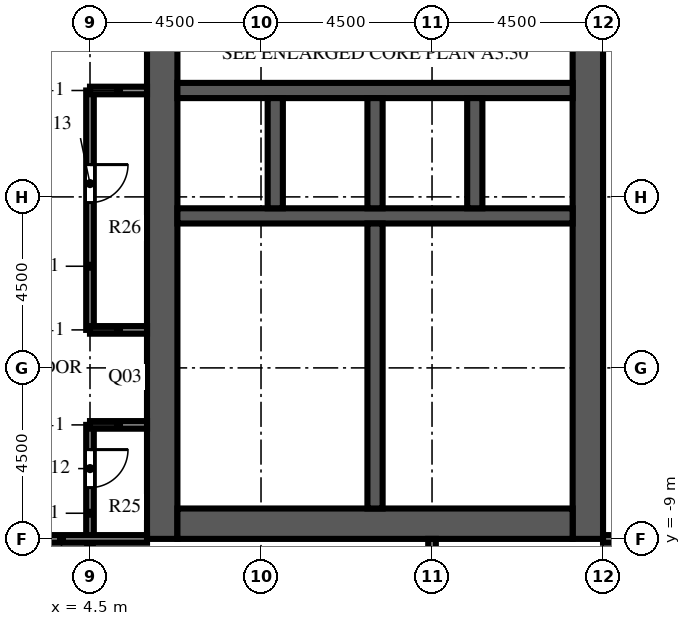
"""IFC4 building model, lengths in metres.
Left out: names, types, materials, properties, quantities, classifications, styles, units other than length and angle.
Written with IfcOpenShell. Run it as: python <this file> out.ifc"""

import sys

from ifc_helpers import new_model, si_unit, direction, frame, frame_2d, origin, place, context, subcontext, project, spatial, rectangle, extrude, element, fill, save


model = new_model("IFC4")
c1 = context("Model", 3, precision=1e-05, world=origin(), true_north=direction((0.0, 1.0)))
c2 = subcontext(c1, "Body", "Model", "MODEL_VIEW")
j1 = project(units=[si_unit("LENGTHUNIT", "METRE"), si_unit("PLANEANGLEUNIT", "RADIAN")], contexts=[c1])
p1 = place(None, origin())
s1 = spatial("IfcSite", under=j1, at=p1, CompositionType="ELEMENT")
p2 = place(p1, origin())
s2 = spatial("IfcBuilding", under=s1, at=p2, CompositionType="ELEMENT")
p3 = place(p2, frame((0.0, 0.0, 199.7)))
s3 = spatial("IfcBuildingStorey", under=s2, at=p3, CompositionType="ELEMENT", Elevation=199.7)
p4 = place(p3, frame((6.4, -9.0, 0.0), z_axis=(0.0, 0.0, 1.0), x_axis=(0.0, 1.0, 0.0)))
e1 = element("IfcWall", 1, at=p4, inside=s3, PredefinedType="SHEAR", context=c2, shape_type="SweptSolid", body=[
    extrude(rectangle(XDim=27.5, YDim=0.8, at=frame_2d((13.75, 0.0))), origin(), (0.0, 0.0, 1.0), 4.1),
])
p5 = place(p4, frame((12.55, 0.0, 0.0)))
e2 = element("IfcOpeningElement", 2, at=p5, cuts=e1, PredefinedType="OPENING", context=c2, shape_type="SweptSolid", body=[
    extrude(rectangle(XDim=2.4, YDim=2.4, at=frame_2d((1.2, 1.2))), frame((0.0, 0.41, 0.0), z_axis=(0.0, -1.0, 0.0), x_axis=(1.0, 0.0, 0.0)), (0.0, 0.0, 1.0), 0.82),
])
p6 = place(p4, frame((3.95, 0.0, 0.0)))
e3 = element("IfcOpeningElement", 3, at=p6, cuts=e1, PredefinedType="OPENING", context=c2, shape_type="SweptSolid", body=[
    extrude(rectangle(XDim=1.2, YDim=2.1, at=frame_2d((0.6, 1.05))), frame((0.0, 0.41, 0.0), z_axis=(0.0, -1.0, 0.0), x_axis=(1.0, 0.0, 0.0)), (0.0, 0.0, 1.0), 0.82),
])
p7 = place(p4, frame((19.45, 0.0, 0.0)))
e4 = element("IfcOpeningElement", 4, at=p7, cuts=e1, PredefinedType="OPENING", context=c2, shape_type="SweptSolid", body=[
    extrude(rectangle(XDim=1.0, YDim=2.1, at=frame_2d((0.5, 1.05))), frame((0.0, 0.41, 0.0), z_axis=(0.0, -1.0, 0.0), x_axis=(1.0, 0.0, 0.0)), (0.0, 0.0, 1.0), 0.82),
])
p8 = place(p4, frame((21.137, 0.0, 0.0)))
e5 = element("IfcOpeningElement", 5, at=p8, cuts=e1, PredefinedType="OPENING", context=c2, shape_type="SweptSolid", body=[
    extrude(rectangle(XDim=1.0, YDim=2.1, at=frame_2d((0.5, 1.05))), frame((0.0, 0.41, 0.0), z_axis=(0.0, -1.0, 0.0), x_axis=(1.0, 0.0, 0.0)), (0.0, 0.0, 1.0), 0.82),
])
p9 = place(p4, frame((23.2, 0.0, 0.0)))
e6 = element("IfcOpeningElement", 6, at=p9, cuts=e1, PredefinedType="OPENING", context=c2, shape_type="SweptSolid", body=[
    extrude(rectangle(XDim=1.0, YDim=2.1, at=frame_2d((0.5, 1.05))), frame((0.0, 0.41, 0.0), z_axis=(0.0, -1.0, 0.0), x_axis=(1.0, 0.0, 0.0)), (0.0, 0.0, 1.0), 0.82),
])
p10 = place(p4, frame((25.262, 0.0, 0.0)))
e7 = element("IfcOpeningElement", 7, at=p10, cuts=e1, PredefinedType="OPENING", context=c2, shape_type="SweptSolid", body=[
    extrude(rectangle(XDim=1.0, YDim=2.1, at=frame_2d((0.5, 1.05))), frame((0.0, 0.41, 0.0), z_axis=(0.0, -1.0, 0.0), x_axis=(1.0, 0.0, 0.0)), (0.0, 0.0, 1.0), 0.82),
])
p11 = place(p3, frame((17.6, -9.0, 0.0), z_axis=(0.0, 0.0, 1.0), x_axis=(0.0, 1.0, 0.0)))
e8 = element("IfcWall", 8, at=p11, inside=s3, PredefinedType="SHEAR", context=c2, shape_type="SweptSolid", body=[
    extrude(rectangle(XDim=27.5, YDim=0.8, at=frame_2d((13.75, 0.0))), origin(), (0.0, 0.0, 1.0), 4.1),
])
p12 = place(p11, frame((12.55, 0.0, 0.0)))
e9 = element("IfcOpeningElement", 9, at=p12, cuts=e8, PredefinedType="OPENING", context=c2, shape_type="SweptSolid", body=[
    extrude(rectangle(XDim=2.4, YDim=2.4, at=frame_2d((1.2, 1.2))), frame((0.0, 0.41, 0.0), z_axis=(0.0, -1.0, 0.0), x_axis=(1.0, 0.0, 0.0)), (0.0, 0.0, 1.0), 0.82),
])
p13 = place(p11, frame((6.825, 0.0, 0.0)))
e10 = element("IfcOpeningElement", 10, at=p13, cuts=e8, PredefinedType="OPENING", context=c2, shape_type="SweptSolid", body=[
    extrude(rectangle(XDim=1.2, YDim=2.1, at=frame_2d((0.6, 1.05))), frame((0.0, 0.41, 0.0), z_axis=(0.0, -1.0, 0.0), x_axis=(1.0, 0.0, 0.0)), (0.0, 0.0, 1.0), 0.82),
])
p14 = place(p11, frame((19.475, 0.0, 0.0)))
e11 = element("IfcOpeningElement", 11, at=p14, cuts=e8, PredefinedType="OPENING", context=c2, shape_type="SweptSolid", body=[
    extrude(rectangle(XDim=1.2, YDim=2.1, at=frame_2d((0.6, 1.05))), frame((0.0, 0.41, 0.0), z_axis=(0.0, -1.0, 0.0), x_axis=(1.0, 0.0, 0.0)), (0.0, 0.0, 1.0), 0.82),
])
p15 = place(p3, frame((6.8, -8.6, 0.0), z_axis=(0.0, 0.0, 1.0), x_axis=(1.0, 0.0, 0.0)))
e12 = element("IfcWall", 12, at=p15, inside=s3, PredefinedType="SHEAR", context=c2, shape_type="SweptSolid", body=[
    extrude(rectangle(XDim=10.4, YDim=0.8, at=frame_2d((5.2, 0.0))), origin(), (0.0, 0.0, 1.0), 4.1),
])
p16 = place(p3, frame((6.8, -0.5, 0.0), z_axis=(0.0, 0.0, 1.0), x_axis=(1.0, 0.0, 0.0)))
e13 = element("IfcWall", 13, at=p16, inside=s3, PredefinedType="SHEAR", context=c2, shape_type="SweptSolid", body=[
    extrude(rectangle(XDim=10.4, YDim=0.4, at=frame_2d((5.2, 0.0))), origin(), (0.0, 0.0, 1.0), 4.1),
])
p17 = place(p3, frame((6.8, 2.8, 0.0), z_axis=(0.0, 0.0, 1.0), x_axis=(1.0, 0.0, 0.0)))
e14 = element("IfcWall", 14, at=p17, inside=s3, PredefinedType="SHEAR", context=c2, shape_type="SweptSolid", body=[
    extrude(rectangle(XDim=10.4, YDim=0.4, at=frame_2d((5.2, 0.0))), origin(), (0.0, 0.0, 1.0), 4.1),
])
p18 = place(p17, frame((0.738, 0.0, 0.0)))
e15 = element("IfcOpeningElement", 15, at=p18, cuts=e14, PredefinedType="OPENING", context=c2, shape_type="SweptSolid", body=[
    extrude(rectangle(XDim=1.1, YDim=2.1, at=frame_2d((0.55, 1.05))), frame((0.0, 0.21, 0.0), z_axis=(0.0, -1.0, 0.0), x_axis=(1.0, 0.0, 0.0)), (0.0, 0.0, 1.0), 0.42),
])
p19 = place(p17, frame((3.337, 0.0, 0.0)))
e16 = element("IfcOpeningElement", 16, at=p19, cuts=e14, PredefinedType="OPENING", context=c2, shape_type="SweptSolid", body=[
    extrude(rectangle(XDim=1.1, YDim=2.1, at=frame_2d((0.55, 1.05))), frame((0.0, 0.21, 0.0), z_axis=(0.0, -1.0, 0.0), x_axis=(1.0, 0.0, 0.0)), (0.0, 0.0, 1.0), 0.42),
])
p20 = place(p17, frame((6.012, 0.0, 0.0)))
e17 = element("IfcOpeningElement", 17, at=p20, cuts=e14, PredefinedType="OPENING", context=c2, shape_type="SweptSolid", body=[
    extrude(rectangle(XDim=1.0, YDim=2.1, at=frame_2d((0.5, 1.05))), frame((0.0, 0.21, 0.0), z_axis=(0.0, -1.0, 0.0), x_axis=(1.0, 0.0, 0.0)), (0.0, 0.0, 1.0), 0.42),
])
p21 = place(p17, frame((8.613, 0.0, 0.0)))
e18 = element("IfcOpeningElement", 18, at=p21, cuts=e14, PredefinedType="OPENING", context=c2, shape_type="SweptSolid", body=[
    extrude(rectangle(XDim=1.0, YDim=2.1, at=frame_2d((0.5, 1.05))), frame((0.0, 0.21, 0.0), z_axis=(0.0, -1.0, 0.0), x_axis=(1.0, 0.0, 0.0)), (0.0, 0.0, 1.0), 0.42),
])
for number, where, z_axis, x_axis in (
    (19, (9.375, -0.3, 0.0), (0.0, 0.0, 1.0), (0.0, 1.0, 0.0)),
    (20, (12.0, -0.3, 0.0), (0.0, 0.0, 1.0), (0.0, 1.0, 0.0)),
    (21, (14.625, -0.3, 0.0), (0.0, 0.0, 1.0), (0.0, 1.0, 0.0)),
):
    element("IfcWall", number, at=place(p3, frame(where, z_axis=z_axis, x_axis=x_axis)), inside=s3, PredefinedType="SHEAR", context=c2, shape_type="SweptSolid", body=[
        extrude(rectangle(XDim=2.9, YDim=0.4, at=frame_2d((1.45, 0.0))), origin(), (0.0, 0.0, 1.0), 4.1),
    ])
p22 = place(p3, frame((12.0, -8.2, 0.0), z_axis=(0.0, 0.0, 1.0), x_axis=(0.0, 1.0, 0.0)))
e22 = element("IfcWall", 22, at=p22, inside=s3, PredefinedType="SHEAR", context=c2, shape_type="SweptSolid", body=[
    extrude(rectangle(XDim=7.5, YDim=0.4, at=frame_2d((3.75, 0.0))), origin(), (0.0, 0.0, 1.0), 4.1),
])
p23 = place(p3, frame((6.8, -5.95, 0.0), z_axis=(0.0, 0.0, 1.0), x_axis=(1.0, 0.0, 0.0)))
e23 = element("IfcWall", 23, at=p23, inside=s3, PredefinedType="PARTITIONING", context=c2, shape_type="SweptSolid", body=[
    extrude(rectangle(XDim=1.6, YDim=0.1, at=frame_2d((0.8, 0.0))), origin(), (0.0, 0.0, 1.0), 3.65),
])
p24 = place(p23, frame((0.3, 0.0, 0.0)))
e24 = element("IfcOpeningElement", 24, at=p24, cuts=e23, PredefinedType="OPENING", context=c2, shape_type="SweptSolid", body=[
    extrude(rectangle(XDim=1.0, YDim=2.1, at=frame_2d((0.5, 1.05))), frame((0.0, 0.06, 0.0), z_axis=(0.0, -1.0, 0.0), x_axis=(1.0, 0.0, 0.0)), (0.0, 0.0, 1.0), 0.12),
])
p25 = place(p3, frame((6.8, -2.95, 0.0), z_axis=(0.0, 0.0, 1.0), x_axis=(1.0, 0.0, 0.0)))
e25 = element("IfcWall", 25, at=p25, inside=s3, PredefinedType="PARTITIONING", context=c2, shape_type="SweptSolid", body=[
    extrude(rectangle(XDim=1.6, YDim=0.1, at=frame_2d((0.8, 0.0))), origin(), (0.0, 0.0, 1.0), 3.65),
])
p26 = place(p25, frame((0.3, 0.0, 0.0)))
e26 = element("IfcOpeningElement", 26, at=p26, cuts=e25, PredefinedType="OPENING", context=c2, shape_type="SweptSolid", body=[
    extrude(rectangle(XDim=1.0, YDim=2.1, at=frame_2d((0.5, 1.05))), frame((0.0, 0.06, 0.0), z_axis=(0.0, -1.0, 0.0), x_axis=(1.0, 0.0, 0.0)), (0.0, 0.0, 1.0), 0.12),
])
p27 = place(p3, frame((8.4, -5.95, 0.0), z_axis=(0.0, 0.0, 1.0), x_axis=(0.0, 1.0, 0.0)))
e27 = element("IfcWall", 27, at=p27, inside=s3, PredefinedType="PARTITIONING", context=c2, shape_type="SweptSolid", body=[
    extrude(rectangle(XDim=3.0, YDim=0.1, at=frame_2d((1.5, 0.0))), origin(), (0.0, 0.0, 1.0), 3.65),
])
p28 = place(p27, frame((1.0, 0.0, 0.0)))
e28 = element("IfcOpeningElement", 28, at=p28, cuts=e27, PredefinedType="OPENING", context=c2, shape_type="SweptSolid", body=[
    extrude(rectangle(XDim=1.0, YDim=2.1, at=frame_2d((0.5, 1.05))), frame((0.0, 0.06, 0.0), z_axis=(0.0, -1.0, 0.0), x_axis=(1.0, 0.0, 0.0)), (0.0, 0.0, 1.0), 0.12),
])
for number, where, z_axis, x_axis in (
    (29, (8.4, -5.95, 0.0), (0.0, 0.0, 1.0), (1.0, 0.0, 0.0)),
    (30, (8.4, -2.95, 0.0), (0.0, 0.0, 1.0), (1.0, 0.0, 0.0)),
):
    element("IfcWall", number, at=place(p3, frame(where, z_axis=z_axis, x_axis=x_axis)), inside=s3, PredefinedType="PARTITIONING", context=c2, shape_type="SweptSolid", body=[
        extrude(rectangle(XDim=3.4, YDim=0.1, at=frame_2d((1.7, 0.0))), origin(), (0.0, 0.0, 1.0), 3.65),
    ])
p29 = place(p3, frame((4.5, -9.0, 0.0), z_axis=(0.0, 0.0, 1.0), x_axis=(0.0, -1.0, 0.0)))
e31 = element("IfcWall", 31, at=p29, inside=s3, PredefinedType="PARTITIONING", context=c2, shape_type="SweptSolid", body=[
    extrude(rectangle(XDim=17.5, YDim=0.15, at=frame_2d((8.75, 0.0))), origin(), (0.0, 0.0, 1.0), 3.65),
])
p30 = place(p29, frame((3.4, 0.0, 0.0)))
e32 = element("IfcOpeningElement", 32, at=p30, cuts=e31, PredefinedType="OPENING", context=c2, shape_type="SweptSolid", body=[
    extrude(rectangle(XDim=1.0, YDim=2.1, at=frame_2d((0.5, 1.05))), frame((0.0, 0.085, 0.0), z_axis=(0.0, -1.0, 0.0), x_axis=(1.0, 0.0, 0.0)), (0.0, 0.0, 1.0), 0.17),
])
p31 = place(p3, frame((4.5, -6.0, 0.0), z_axis=(0.0, 0.0, 1.0), x_axis=(0.0, -1.0, 0.0)))
e33 = element("IfcWall", 33, at=p31, inside=s3, PredefinedType="PARTITIONING", context=c2, shape_type="SweptSolid", body=[
    extrude(rectangle(XDim=3.0, YDim=0.2, at=frame_2d((1.5, 0.0))), origin(), (0.0, 0.0, 1.0), 3.65),
])
p32 = place(p31, frame((0.65, 0.0, 0.0)))
e34 = element("IfcOpeningElement", 34, at=p32, cuts=e33, PredefinedType="OPENING", context=c2, shape_type="SweptSolid", body=[
    extrude(rectangle(XDim=1.0, YDim=2.1, at=frame_2d((0.5, 1.05))), frame((0.0, 0.11, 0.0), z_axis=(0.0, -1.0, 0.0), x_axis=(1.0, 0.0, 0.0)), (0.0, 0.0, 1.0), 0.22),
])
p33 = place(p3, frame((4.5, 2.8, 0.0), z_axis=(0.0, 0.0, 1.0), x_axis=(0.0, -1.0, 0.0)))
e35 = element("IfcWall", 35, at=p33, inside=s3, PredefinedType="PARTITIONING", context=c2, shape_type="SweptSolid", body=[
    extrude(rectangle(XDim=6.3, YDim=0.2, at=frame_2d((3.15, 0.0))), origin(), (0.0, 0.0, 1.0), 3.65),
])
p34 = place(p33, frame((1.95, 0.0, 0.0)))
e36 = element("IfcOpeningElement", 36, at=p34, cuts=e35, PredefinedType="OPENING", context=c2, shape_type="SweptSolid", body=[
    extrude(rectangle(XDim=1.0, YDim=2.1, at=frame_2d((0.5, 1.05))), frame((0.0, 0.11, 0.0), z_axis=(0.0, -1.0, 0.0), x_axis=(1.0, 0.0, 0.0)), (0.0, 0.0, 1.0), 0.22),
])
p35 = place(p3, frame((13.5, -26.5, 0.0), z_axis=(0.0, 0.0, 1.0), x_axis=(0.0, 1.0, 0.0)))
e37 = element("IfcWall", 37, at=p35, inside=s3, PredefinedType="PARTITIONING", context=c2, shape_type="SweptSolid", body=[
    extrude(rectangle(XDim=17.5, YDim=0.2, at=frame_2d((8.75, 0.0))), origin(), (0.0, 0.0, 1.0), 3.65),
])
p36 = place(p3, frame((1.5, -9.0, 0.0), z_axis=(0.0, 0.0, 1.0), x_axis=(1.0, 0.0, 0.0)))
e38 = element("IfcWall", 38, at=p36, inside=s3, PredefinedType="PARTITIONING", context=c2, shape_type="SweptSolid", body=[
    extrude(rectangle(XDim=4.5, YDim=0.2, at=frame_2d((2.25, 0.0))), origin(), (0.0, 0.0, 1.0), 3.65),
])
p37 = place(p3, frame((21.0, -9.0, 0.0), z_axis=(0.0, 0.0, 1.0), x_axis=(-1.0, 0.0, 0.0)))
e39 = element("IfcWall", 39, at=p37, inside=s3, PredefinedType="PARTITIONING", context=c2, shape_type="SweptSolid", body=[
    extrude(rectangle(XDim=3.0, YDim=0.2, at=frame_2d((1.5, 0.0))), origin(), (0.0, 0.0, 1.0), 3.65),
])
p38 = place(p37, frame((0.9, 0.0, 0.0)))
e40 = element("IfcOpeningElement", 40, at=p38, cuts=e39, PredefinedType="OPENING", context=c2, shape_type="SweptSolid", body=[
    extrude(rectangle(XDim=1.0, YDim=2.1, at=frame_2d((0.5, 1.05))), frame((0.0, 0.11, 0.0), z_axis=(0.0, -1.0, 0.0), x_axis=(1.0, 0.0, 0.0)), (0.0, 0.0, 1.0), 0.22),
])
for number, where, z_axis, x_axis in (
    (41, (4.5, -6.0, 0.0), (0.0, 0.0, 1.0), (1.0, 0.0, 0.0)),
    (42, (4.5, -3.5, 0.0), (0.0, 0.0, 1.0), (1.0, 0.0, 0.0)),
    (43, (4.5, 2.8, 0.0), (0.0, 0.0, 1.0), (1.0, 0.0, 0.0)),
):
    element("IfcWall", number, at=place(p3, frame(where, z_axis=z_axis, x_axis=x_axis)), inside=s3, PredefinedType="PARTITIONING", context=c2, shape_type="SweptSolid", body=[
        extrude(rectangle(XDim=1.5, YDim=0.2, at=frame_2d((0.75, 0.0))), origin(), (0.0, 0.0, 1.0), 3.65),
    ])
p39 = place(p18, origin())
e44 = element("IfcDoor", 44, at=p39, inside=s3, OperationType="DOUBLE_DOOR_SLIDING", PredefinedType="DOOR", context=c2, shape_type="SweptSolid", body=[
    extrude(rectangle(XDim=1.1, YDim=2.1, at=frame_2d((0.55, 1.05))), frame((0.0, 0.025, 0.0), z_axis=(0.0, -1.0, 0.0), x_axis=(1.0, 0.0, 0.0)), (0.0, 0.0, 1.0), 0.05),
])
fill(e15, e44)
p40 = place(p19, origin())
e45 = element("IfcDoor", 45, at=p40, inside=s3, OperationType="DOUBLE_DOOR_SLIDING", PredefinedType="DOOR", context=c2, shape_type="SweptSolid", body=[
    extrude(rectangle(XDim=1.1, YDim=2.1, at=frame_2d((0.55, 1.05))), frame((0.0, 0.025, 0.0), z_axis=(0.0, -1.0, 0.0), x_axis=(1.0, 0.0, 0.0)), (0.0, 0.0, 1.0), 0.05),
])
fill(e16, e45)
p41 = place(p5, origin())
e46 = element("IfcDoor", 46, at=p41, inside=s3, OperationType="DOUBLE_DOOR_DOUBLE_SWING", PredefinedType="DOOR", context=c2, shape_type="SweptSolid", body=[
    extrude(rectangle(XDim=2.4, YDim=2.4, at=frame_2d((1.2, 1.2))), frame((0.0, 0.025, 0.0), z_axis=(0.0, -1.0, 0.0), x_axis=(1.0, 0.0, 0.0)), (0.0, 0.0, 1.0), 0.05),
])
fill(e2, e46)
p42 = place(p12, origin())
e47 = element("IfcDoor", 47, at=p42, inside=s3, OperationType="DOUBLE_DOOR_DOUBLE_SWING", PredefinedType="DOOR", context=c2, shape_type="SweptSolid", body=[
    extrude(rectangle(XDim=2.4, YDim=2.4, at=frame_2d((1.2, 1.2))), frame((0.0, 0.025, 0.0), z_axis=(0.0, -1.0, 0.0), x_axis=(1.0, 0.0, 0.0)), (0.0, 0.0, 1.0), 0.05),
])
fill(e9, e47)
p43 = place(p13, frame((1.2, 0.0, 0.0), z_axis=(0.0, 0.0, 1.0), x_axis=(-1.0, 0.0, 0.0)))
e48 = element("IfcDoor", 48, at=p43, inside=s3, OperationType="SINGLE_SWING_LEFT", PredefinedType="DOOR", context=c2, shape_type="SweptSolid", body=[
    extrude(rectangle(XDim=1.2, YDim=2.1, at=frame_2d((0.6, 1.05))), frame((0.0, 0.025, 0.0), z_axis=(0.0, -1.0, 0.0), x_axis=(1.0, 0.0, 0.0)), (0.0, 0.0, 1.0), 0.05),
])
fill(e10, e48)
p44 = place(p20, origin())
e49 = element("IfcDoor", 49, at=p44, inside=s3, OperationType="SINGLE_SWING_LEFT", PredefinedType="DOOR", context=c2, shape_type="SweptSolid", body=[
    extrude(rectangle(XDim=1.0, YDim=2.1, at=frame_2d((0.5, 1.05))), frame((0.0, 0.025, 0.0), z_axis=(0.0, -1.0, 0.0), x_axis=(1.0, 0.0, 0.0)), (0.0, 0.0, 1.0), 0.05),
])
fill(e17, e49)
p45 = place(p21, origin())
e50 = element("IfcDoor", 50, at=p45, inside=s3, OperationType="SINGLE_SWING_RIGHT", PredefinedType="DOOR", context=c2, shape_type="SweptSolid", body=[
    extrude(rectangle(XDim=1.0, YDim=2.1, at=frame_2d((0.5, 1.05))), frame((0.0, 0.025, 0.0), z_axis=(0.0, -1.0, 0.0), x_axis=(1.0, 0.0, 0.0)), (0.0, 0.0, 1.0), 0.05),
])
fill(e18, e50)
p46 = place(p6, origin())
e51 = element("IfcDoor", 51, at=p46, inside=s3, OperationType="SINGLE_SWING_RIGHT", PredefinedType="DOOR", context=c2, shape_type="SweptSolid", body=[
    extrude(rectangle(XDim=1.2, YDim=2.1, at=frame_2d((0.6, 1.05))), frame((0.0, -0.325, 0.0), z_axis=(0.0, -1.0, 0.0), x_axis=(1.0, 0.0, 0.0)), (0.0, 0.0, 1.0), 0.05),
])
fill(e3, e51)
p47 = place(p24, origin())
e52 = element("IfcDoor", 52, at=p47, inside=s3, OperationType="SINGLE_SWING_LEFT", PredefinedType="DOOR", context=c2, shape_type="SweptSolid", body=[
    extrude(rectangle(XDim=1.0, YDim=2.1, at=frame_2d((0.5, 1.05))), frame((0.0, 0.025, 0.0), z_axis=(0.0, -1.0, 0.0), x_axis=(1.0, 0.0, 0.0)), (0.0, 0.0, 1.0), 0.05),
])
fill(e24, e52)
p48 = place(p26, origin())
e53 = element("IfcDoor", 53, at=p48, inside=s3, OperationType="SINGLE_SWING_RIGHT", PredefinedType="DOOR", context=c2, shape_type="SweptSolid", body=[
    extrude(rectangle(XDim=1.0, YDim=2.1, at=frame_2d((0.5, 1.05))), frame((0.0, 0.025, 0.0), z_axis=(0.0, -1.0, 0.0), x_axis=(1.0, 0.0, 0.0)), (0.0, 0.0, 1.0), 0.05),
])
fill(e26, e53)
p49 = place(p28, origin())
e54 = element("IfcDoor", 54, at=p49, inside=s3, OperationType="SINGLE_SWING_LEFT", PredefinedType="DOOR", context=c2, shape_type="SweptSolid", body=[
    extrude(rectangle(XDim=1.0, YDim=2.1, at=frame_2d((0.5, 1.05))), frame((0.0, 0.025, 0.0), z_axis=(0.0, -1.0, 0.0), x_axis=(1.0, 0.0, 0.0)), (0.0, 0.0, 1.0), 0.05),
])
fill(e28, e54)
p50 = place(p32, origin())
e55 = element("IfcDoor", 55, at=p50, inside=s3, OperationType="SINGLE_SWING_LEFT", PredefinedType="DOOR", context=c2, shape_type="SweptSolid", body=[
    extrude(rectangle(XDim=1.0, YDim=2.1, at=frame_2d((0.5, 1.05))), frame((0.0, 0.025, 0.0), z_axis=(0.0, -1.0, 0.0), x_axis=(1.0, 0.0, 0.0)), (0.0, 0.0, 1.0), 0.05),
])
fill(e34, e55)
p51 = place(p34, origin())
e56 = element("IfcDoor", 56, at=p51, inside=s3, OperationType="SINGLE_SWING_LEFT", PredefinedType="DOOR", context=c2, shape_type="SweptSolid", body=[
    extrude(rectangle(XDim=1.0, YDim=2.1, at=frame_2d((0.5, 1.05))), frame((0.0, 0.025, 0.0), z_axis=(0.0, -1.0, 0.0), x_axis=(1.0, 0.0, 0.0)), (0.0, 0.0, 1.0), 0.05),
])
fill(e36, e56)
save(model, sys.argv[1])
